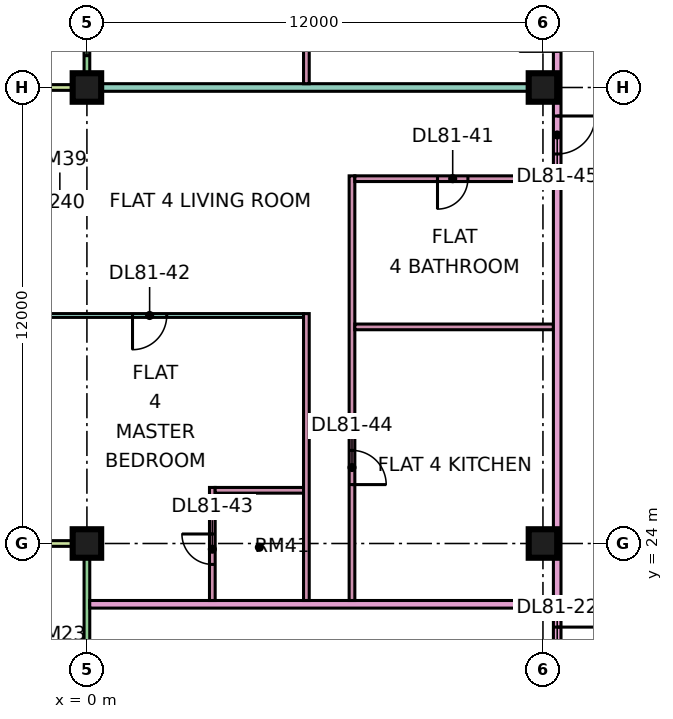
"""IFC4 building model, lengths in metres.
Left out: names, types, materials, properties, quantities, classifications, styles, units other than length and angle.
Written with IfcOpenShell. Run it as: python <this file> out.ifc"""

import sys

from ifc_helpers import new_model, si_unit, direction, frame, frame_2d, origin, origin_2d, place, context, subcontext, project, spatial, rectangle, extrude, element, fill, save


model = new_model("IFC4")
c1 = context("Model", 3, precision=1e-05, world=origin(), true_north=direction((0.0, 1.0)))
c2 = subcontext(c1, "Body", "Model", "MODEL_VIEW")
j1 = project(units=[si_unit("LENGTHUNIT", "METRE"), si_unit("PLANEANGLEUNIT", "RADIAN")], contexts=[c1])
p1 = place(None, origin())
s1 = spatial("IfcSite", under=j1, at=p1, CompositionType="ELEMENT")
p2 = place(p1, origin())
s2 = spatial("IfcBuilding", under=s1, at=p2, CompositionType="ELEMENT")
p3 = place(p2, frame((0.0, 0.0, 350.15)))
s3 = spatial("IfcBuildingStorey", under=s2, at=p3, CompositionType="ELEMENT", Elevation=350.15)
p4 = place(p3, frame((0.0, 24.0, 0.0), z_axis=(0.0, 0.0, 1.0), x_axis=(1.0, 0.0, 0.0)))
e1 = element("IfcColumn", 1, at=p4, inside=s3, PredefinedType="COLUMN", context=c2, shape_type="SweptSolid", body=[
    extrude(rectangle(XDim=0.75, YDim=0.75, at=origin_2d()), origin(), (0.0, 0.0, 1.0), 3.75),
])
p5 = place(p3, frame((0.0, 36.0, 0.0), z_axis=(0.0, 0.0, 1.0), x_axis=(1.0, 0.0, 0.0)))
e2 = element("IfcColumn", 2, at=p5, inside=s3, PredefinedType="COLUMN", context=c2, shape_type="SweptSolid", body=[
    extrude(rectangle(XDim=0.75, YDim=0.75, at=origin_2d()), origin(), (0.0, 0.0, 1.0), 3.75),
])
for number, where, z_axis, x_axis in (
    (3, (12.0, 24.0, 0.0), (0.0, 0.0, 1.0), (1.0, 0.0, 0.0)),
    (4, (12.0, 36.0, 0.0), (0.0, 0.0, 1.0), (1.0, 0.0, 0.0)),
):
    element("IfcColumn", number, at=place(p3, frame(where, z_axis=z_axis, x_axis=x_axis)), inside=s3, PredefinedType="COLUMN", context=c2, shape_type="SweptSolid", body=[
        extrude(rectangle(XDim=0.75, YDim=0.75, at=origin_2d()), origin(), (0.0, 0.0, 1.0), 3.75),
    ])
p6 = place(p3, frame((0.0, 47.925, 0.0), z_axis=(0.0, 0.0, 1.0), x_axis=(0.0, -1.0, 0.0)))
e5 = element("IfcWall", 5, at=p6, inside=s3, PredefinedType="SOLIDWALL", context=c2, shape_type="SweptSolid", body=[
    extrude(rectangle(XDim=11.85, YDim=0.15, at=frame_2d((5.925, 0.0))), origin(), (0.0, 0.0, 1.0), 3.35),
])
p7 = place(p6, frame((0.625, 0.0, 0.0)))
e6 = element("IfcOpeningElement", 6, at=p7, cuts=e5, PredefinedType="OPENING", context=c2, shape_type="SweptSolid", body=[
    extrude(rectangle(XDim=1.2, YDim=2.4, at=frame_2d((0.6, 1.2))), frame((0.0, 0.085, 0.0), z_axis=(0.0, -1.0, 0.0), x_axis=(1.0, 0.0, 0.0)), (0.0, 0.0, 1.0), 0.17),
])
p8 = place(p6, frame((3.762, 0.0, 0.45)))
e7 = element("IfcOpeningElement", 7, at=p8, cuts=e5, PredefinedType="OPENING", context=c2, shape_type="SweptSolid", body=[
    extrude(rectangle(XDim=1.8, YDim=2.4, at=frame_2d((0.9, 1.2))), frame((0.0, 0.085, 0.0), z_axis=(0.0, -1.0, 0.0), x_axis=(1.0, 0.0, 0.0)), (0.0, 0.0, 1.0), 0.17),
])
p9 = place(p6, frame((6.525, 0.0, 0.45)))
e8 = element("IfcOpeningElement", 8, at=p9, cuts=e5, PredefinedType="OPENING", context=c2, shape_type="SweptSolid", body=[
    extrude(rectangle(XDim=1.8, YDim=2.4, at=frame_2d((0.9, 1.2))), frame((0.0, 0.085, 0.0), z_axis=(0.0, -1.0, 0.0), x_axis=(1.0, 0.0, 0.0)), (0.0, 0.0, 1.0), 0.17),
])
p10 = place(p6, frame((9.288, 0.0, 0.45)))
e9 = element("IfcOpeningElement", 9, at=p10, cuts=e5, PredefinedType="OPENING", context=c2, shape_type="SweptSolid", body=[
    extrude(rectangle(XDim=1.8, YDim=2.4, at=frame_2d((0.9, 1.2))), frame((0.0, 0.085, 0.0), z_axis=(0.0, -1.0, 0.0), x_axis=(1.0, 0.0, 0.0)), (0.0, 0.0, 1.0), 0.17),
])
p11 = place(p3, frame((-1.5, 36.0, 0.0), z_axis=(0.0, 0.0, 1.0), x_axis=(1.0, 0.0, 0.0)))
e10 = element("IfcWall", 10, at=p11, inside=s3, PredefinedType="SOLIDWALL", context=c2, shape_type="SweptSolid", body=[
    extrude(rectangle(XDim=1.5, YDim=0.15, at=frame_2d((0.75, 0.0))), origin(), (0.0, 0.0, 1.0), 3.35),
])
p12 = place(p3, frame((0.0, 23.925, 0.0), z_axis=(0.0, 0.0, 1.0), x_axis=(0.0, -1.0, 0.0)))
e11 = element("IfcWall", 11, at=p12, inside=s3, PredefinedType="SOLIDWALL", context=c2, shape_type="SweptSolid", body=[
    extrude(rectangle(XDim=11.35, YDim=0.15, at=frame_2d((5.675, 0.0))), origin(), (0.0, 0.0, 1.0), 3.35),
])
p13 = place(p12, frame((6.738, 0.0, 0.0)))
e12 = element("IfcOpeningElement", 12, at=p13, cuts=e11, PredefinedType="OPENING", context=c2, shape_type="SweptSolid", body=[
    extrude(rectangle(XDim=1.8, YDim=2.4, at=frame_2d((0.9, 1.2))), frame((0.0, 0.085, 0.0), z_axis=(0.0, -1.0, 0.0), x_axis=(1.0, 0.0, 0.0)), (0.0, 0.0, 1.0), 0.17),
])
p14 = place(p3, frame((-1.5, 24.0, 0.0), z_axis=(0.0, 0.0, 1.0), x_axis=(1.0, 0.0, 0.0)))
e13 = element("IfcWall", 13, at=p14, inside=s3, PredefinedType="SOLIDWALL", context=c2, shape_type="SweptSolid", body=[
    extrude(rectangle(XDim=1.5, YDim=0.15, at=frame_2d((0.75, 0.0))), origin(), (0.0, 0.0, 1.0), 3.35),
])
p15 = place(p3, frame((-1.35, 30.0, 0.0), z_axis=(0.0, 0.0, 1.0), x_axis=(1.0, 0.0, 0.0)))
e14 = element("IfcWall", 14, at=p15, inside=s3, PredefinedType="PARTITIONING", context=c2, shape_type="SweptSolid", body=[
    extrude(rectangle(XDim=7.05, YDim=0.1, at=frame_2d((3.525, 0.0))), origin(), (0.0, 0.0, 1.0), 3.35),
])
p16 = place(p15, frame((2.55, 0.0, 0.0)))
e15 = element("IfcOpeningElement", 15, at=p16, cuts=e14, PredefinedType="OPENING", context=c2, shape_type="SweptSolid", body=[
    extrude(rectangle(XDim=0.9, YDim=2.1, at=frame_2d((0.45, 1.05))), frame((0.0, 0.06, 0.0), z_axis=(0.0, -1.0, 0.0), x_axis=(1.0, 0.0, 0.0)), (0.0, 0.0, 1.0), 0.12),
])
e16 = element("IfcWall", 16, at=p5, inside=s3, PredefinedType="PARTITIONING", context=c2, shape_type="SweptSolid", body=[
    extrude(rectangle(XDim=12.275, YDim=0.2, at=frame_2d((6.137, 0.0))), origin(), (0.0, 0.0, 1.0), 3.35),
])
p17 = place(p3, frame((0.074, 22.4, 0.0), z_axis=(0.0, 0.0, 1.0), x_axis=(1.0, 0.0, 0.0)))
e17 = element("IfcWall", 17, at=p17, inside=s3, PredefinedType="PARTITIONING", context=c2, shape_type="SweptSolid", body=[
    extrude(rectangle(XDim=12.201, YDim=0.2, at=frame_2d((6.101, 0.0))), origin(), (0.0, 0.0, 1.0), 3.35),
])
p18 = place(p3, frame((3.3, 22.5, 0.0), z_axis=(0.0, 0.0, 1.0), x_axis=(0.0, 1.0, 0.0)))
e18 = element("IfcWall", 18, at=p18, inside=s3, PredefinedType="PARTITIONING", context=c2, shape_type="SweptSolid", body=[
    extrude(rectangle(XDim=2.975, YDim=0.15, at=frame_2d((1.488, 0.0))), origin(), (0.0, 0.0, 1.0), 3.35),
])
p19 = place(p18, frame((0.95, 0.0, 0.0)))
e19 = element("IfcOpeningElement", 19, at=p19, cuts=e18, PredefinedType="OPENING", context=c2, shape_type="SweptSolid", body=[
    extrude(rectangle(XDim=0.8, YDim=2.1, at=frame_2d((0.4, 1.05))), frame((0.0, 0.085, 0.0), z_axis=(0.0, -1.0, 0.0), x_axis=(1.0, 0.0, 0.0)), (0.0, 0.0, 1.0), 0.17),
])
p20 = place(p3, frame((3.375, 25.4, 0.0), z_axis=(0.0, 0.0, 1.0), x_axis=(1.0, 0.0, 0.0)))
e20 = element("IfcWall", 20, at=p20, inside=s3, PredefinedType="PARTITIONING", context=c2, shape_type="SweptSolid", body=[
    extrude(rectangle(XDim=2.325, YDim=0.15, at=frame_2d((1.163, 0.0))), origin(), (0.0, 0.0, 1.0), 3.35),
])
p21 = place(p3, frame((5.775, 22.5, 0.0), z_axis=(0.0, 0.0, 1.0), x_axis=(0.0, 1.0, 0.0)))
e21 = element("IfcWall", 21, at=p21, inside=s3, PredefinedType="PARTITIONING", context=c2, shape_type="SweptSolid", body=[
    extrude(rectangle(XDim=7.55, YDim=0.15, at=frame_2d((3.775, 0.0))), origin(), (0.0, 0.0, 1.0), 3.35),
])
p22 = place(p3, frame((5.775, 36.1, 0.0), z_axis=(0.0, 0.0, 1.0), x_axis=(0.0, 1.0, 0.0)))
e22 = element("IfcWall", 22, at=p22, inside=s3, PredefinedType="PARTITIONING", context=c2, shape_type="SweptSolid", body=[
    extrude(rectangle(XDim=11.95, YDim=0.15, at=frame_2d((5.975, 0.0))), origin(), (0.0, 0.0, 1.0), 3.35),
])
p23 = place(p22, frame((0.95, 0.0, 0.0)))
e23 = element("IfcOpeningElement", 23, at=p23, cuts=e22, PredefinedType="OPENING", context=c2, shape_type="SweptSolid", body=[
    extrude(rectangle(XDim=0.9, YDim=2.1, at=frame_2d((0.45, 1.05))), frame((0.0, 0.085, 0.0), z_axis=(0.0, -1.0, 0.0), x_axis=(1.0, 0.0, 0.0)), (0.0, 0.0, 1.0), 0.17),
])
p24 = place(p22, frame((9.95, 0.0, 0.0)))
e24 = element("IfcOpeningElement", 24, at=p24, cuts=e22, PredefinedType="OPENING", context=c2, shape_type="SweptSolid", body=[
    extrude(rectangle(XDim=0.9, YDim=2.1, at=frame_2d((0.45, 1.05))), frame((0.0, 0.085, 0.0), z_axis=(0.0, -1.0, 0.0), x_axis=(1.0, 0.0, 0.0)), (0.0, 0.0, 1.0), 0.17),
])
p25 = place(p22, frame((4.8, 0.0, 0.0)))
e25 = element("IfcOpeningElement", 25, at=p25, cuts=e22, PredefinedType="OPENING", context=c2, shape_type="SweptSolid", body=[
    extrude(rectangle(XDim=0.8, YDim=2.1, at=frame_2d((0.4, 1.05))), frame((0.0, 0.085, 0.0), z_axis=(0.0, -1.0, 0.0), x_axis=(1.0, 0.0, 0.0)), (0.0, 0.0, 1.0), 0.17),
])
p26 = place(p3, frame((6.975, 22.5, 0.0), z_axis=(0.0, 0.0, 1.0), x_axis=(0.0, 1.0, 0.0)))
e26 = element("IfcWall", 26, at=p26, inside=s3, PredefinedType="PARTITIONING", context=c2, shape_type="SweptSolid", body=[
    extrude(rectangle(XDim=11.175, YDim=0.15, at=frame_2d((5.587, 0.0))), origin(), (0.0, 0.0, 1.0), 3.35),
])
p27 = place(p26, frame((3.05, 0.0, 0.0)))
e27 = element("IfcOpeningElement", 27, at=p27, cuts=e26, PredefinedType="OPENING", context=c2, shape_type="SweptSolid", body=[
    extrude(rectangle(XDim=0.9, YDim=2.1, at=frame_2d((0.45, 1.05))), frame((0.0, 0.085, 0.0), z_axis=(0.0, -1.0, 0.0), x_axis=(1.0, 0.0, 0.0)), (0.0, 0.0, 1.0), 0.17),
])
p28 = place(p3, frame((7.05, 29.7, 0.0), z_axis=(0.0, 0.0, 1.0), x_axis=(1.0, 0.0, 0.0)))
e28 = element("IfcWall", 28, at=p28, inside=s3, PredefinedType="PARTITIONING", context=c2, shape_type="SweptSolid", body=[
    extrude(rectangle(XDim=5.225, YDim=0.15, at=frame_2d((2.612, 0.0))), origin(), (0.0, 0.0, 1.0), 3.35),
])
p29 = place(p3, frame((7.05, 33.6, 0.0), z_axis=(0.0, 0.0, 1.0), x_axis=(1.0, 0.0, 0.0)))
e29 = element("IfcWall", 29, at=p29, inside=s3, PredefinedType="PARTITIONING", context=c2, shape_type="SweptSolid", body=[
    extrude(rectangle(XDim=5.225, YDim=0.15, at=frame_2d((2.612, 0.0))), origin(), (0.0, 0.0, 1.0), 3.35),
])
p30 = place(p29, frame((2.175, 0.0, 0.0)))
e30 = element("IfcOpeningElement", 30, at=p30, cuts=e29, PredefinedType="OPENING", context=c2, shape_type="SweptSolid", body=[
    extrude(rectangle(XDim=0.8, YDim=2.1, at=frame_2d((0.4, 1.05))), frame((0.0, 0.085, 0.0), z_axis=(0.0, -1.0, 0.0), x_axis=(1.0, 0.0, 0.0)), (0.0, 0.0, 1.0), 0.17),
])
p31 = place(p3, frame((12.375, 20.0, 0.0), z_axis=(0.0, 0.0, 1.0), x_axis=(0.0, 1.0, 0.0)))
e31 = element("IfcWall", 31, at=p31, inside=s3, PredefinedType="PARTITIONING", context=c2, shape_type="SweptSolid", body=[
    extrude(rectangle(XDim=33.926, YDim=0.2, at=frame_2d((16.963, 0.0))), origin(), (0.0, 0.0, 1.0), 3.35),
])
p32 = place(p31, frame((16.95, 0.0, 0.0)))
e32 = element("IfcOpeningElement", 32, at=p32, cuts=e31, PredefinedType="OPENING", context=c2, shape_type="SweptSolid", body=[
    extrude(rectangle(XDim=1.0, YDim=2.1, at=frame_2d((0.5, 1.05))), frame((0.0, 0.11, 0.0), z_axis=(0.0, -1.0, 0.0), x_axis=(1.0, 0.0, 0.0)), (0.0, 0.0, 1.0), 0.22),
])
p33 = place(p31, frame((0.6, 0.0, 0.0)))
e33 = element("IfcOpeningElement", 33, at=p33, cuts=e31, PredefinedType="OPENING", context=c2, shape_type="SweptSolid", body=[
    extrude(rectangle(XDim=1.2, YDim=2.1, at=frame_2d((0.6, 1.05))), frame((0.0, 0.11, 0.0), z_axis=(0.0, -1.0, 0.0), x_axis=(1.0, 0.0, 0.0)), (0.0, 0.0, 1.0), 0.22),
])
p34 = place(p31, frame((14.25, 0.0, 0.0)))
e34 = element("IfcOpeningElement", 34, at=p34, cuts=e31, PredefinedType="OPENING", context=c2, shape_type="SweptSolid", body=[
    extrude(rectangle(XDim=1.0, YDim=2.1, at=frame_2d((0.5, 1.05))), frame((0.0, 0.11, 0.0), z_axis=(0.0, -1.0, 0.0), x_axis=(1.0, 0.0, 0.0)), (0.0, 0.0, 1.0), 0.22),
])
p35 = place(p10, origin())
e35 = element("IfcWindow", 35, at=p35, inside=s3, PartitioningType="SINGLE_PANEL", PredefinedType="WINDOW", context=c2, shape_type="SweptSolid", body=[
    extrude(rectangle(XDim=1.8, YDim=2.4, at=frame_2d((0.9, 1.2))), frame((0.0, 0.03, 0.0), z_axis=(0.0, -1.0, 0.0), x_axis=(1.0, 0.0, 0.0)), (0.0, 0.0, 1.0), 0.06),
])
fill(e9, e35)
p36 = place(p33, origin())
e36 = element("IfcDoor", 36, at=p36, inside=s3, OperationType="SINGLE_SWING_RIGHT", PredefinedType="DOOR", context=c2, shape_type="SweptSolid", body=[
    extrude(rectangle(XDim=1.2, YDim=2.1, at=frame_2d((0.6, 1.05))), frame((0.0, 0.025, 0.0), z_axis=(0.0, -1.0, 0.0), x_axis=(1.0, 0.0, 0.0)), (0.0, 0.0, 1.0), 0.05),
])
fill(e33, e36)
p37 = place(p30, frame((0.8, 0.0, 0.0), z_axis=(0.0, 0.0, 1.0), x_axis=(-1.0, 0.0, 0.0)))
e37 = element("IfcDoor", 37, at=p37, inside=s3, OperationType="SINGLE_SWING_LEFT", PredefinedType="DOOR", context=c2, shape_type="SweptSolid", body=[
    extrude(rectangle(XDim=0.8, YDim=2.1, at=frame_2d((0.4, 1.05))), frame((0.0, 0.025, 0.0), z_axis=(0.0, -1.0, 0.0), x_axis=(1.0, 0.0, 0.0)), (0.0, 0.0, 1.0), 0.05),
])
fill(e30, e37)
p38 = place(p16, frame((0.9, 0.0, 0.0), z_axis=(0.0, 0.0, 1.0), x_axis=(-1.0, 0.0, 0.0)))
e38 = element("IfcDoor", 38, at=p38, inside=s3, OperationType="SINGLE_SWING_LEFT", PredefinedType="DOOR", context=c2, shape_type="SweptSolid", body=[
    extrude(rectangle(XDim=0.9, YDim=2.1, at=frame_2d((0.45, 1.05))), frame((0.0, 0.025, 0.0), z_axis=(0.0, -1.0, 0.0), x_axis=(1.0, 0.0, 0.0)), (0.0, 0.0, 1.0), 0.05),
])
fill(e15, e38)
p39 = place(p19, frame((0.8, 0.0, 0.0), z_axis=(0.0, 0.0, 1.0), x_axis=(-1.0, 0.0, 0.0)))
e39 = element("IfcDoor", 39, at=p39, inside=s3, OperationType="SINGLE_SWING_RIGHT", PredefinedType="DOOR", context=c2, shape_type="SweptSolid", body=[
    extrude(rectangle(XDim=0.8, YDim=2.1, at=frame_2d((0.4, 1.05))), frame((0.0, 0.025, 0.0), z_axis=(0.0, -1.0, 0.0), x_axis=(1.0, 0.0, 0.0)), (0.0, 0.0, 1.0), 0.05),
])
fill(e19, e39)
p40 = place(p27, frame((0.9, 0.0, 0.0), z_axis=(0.0, 0.0, 1.0), x_axis=(-1.0, 0.0, 0.0)))
e40 = element("IfcDoor", 40, at=p40, inside=s3, OperationType="SINGLE_SWING_LEFT", PredefinedType="DOOR", context=c2, shape_type="SweptSolid", body=[
    extrude(rectangle(XDim=0.9, YDim=2.1, at=frame_2d((0.45, 1.05))), frame((0.0, 0.025, 0.0), z_axis=(0.0, -1.0, 0.0), x_axis=(1.0, 0.0, 0.0)), (0.0, 0.0, 1.0), 0.05),
])
fill(e27, e40)
p41 = place(p34, origin())
e41 = element("IfcDoor", 41, at=p41, inside=s3, OperationType="SINGLE_SWING_RIGHT", PredefinedType="DOOR", context=c2, shape_type="SweptSolid", body=[
    extrude(rectangle(XDim=1.0, YDim=2.1, at=frame_2d((0.5, 1.05))), frame((0.0, 0.025, 0.0), z_axis=(0.0, -1.0, 0.0), x_axis=(1.0, 0.0, 0.0)), (0.0, 0.0, 1.0), 0.05),
])
fill(e34, e41)
save(model, sys.argv[1])
